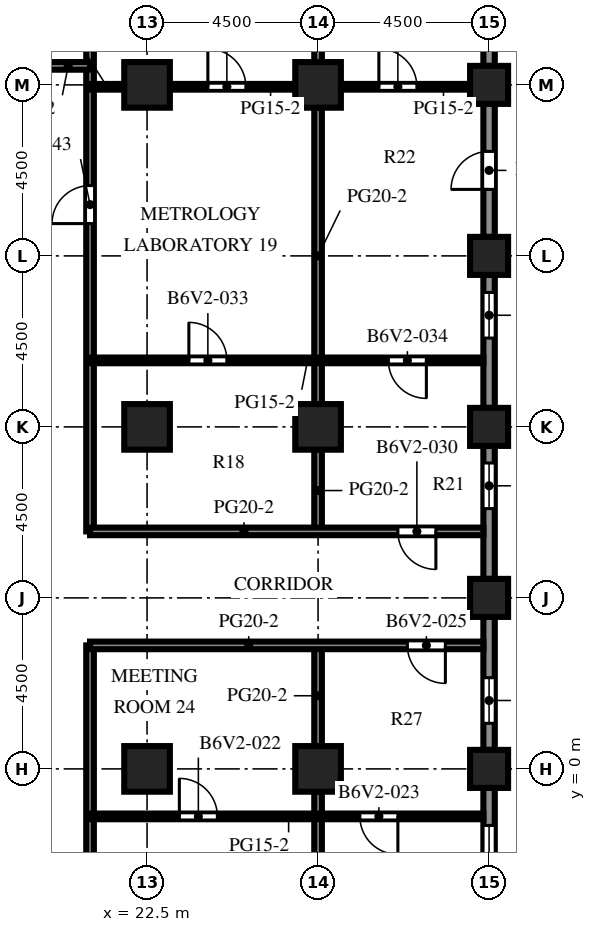
"""IFC4 building model, lengths in metres.
Left out: names, types, materials, properties, quantities, classifications, styles, units other than length and angle.
Written with IfcOpenShell. Run it as: python <this file> out.ifc"""

import sys

from ifc_helpers import new_model, si_unit, direction, frame, frame_2d, origin, origin_2d, place, context, subcontext, project, spatial, rectangle, extrude, element, fill, save


model = new_model("IFC4")
c1 = context("Model", 3, precision=1e-05, world=origin(), true_north=direction((0.0, 1.0)))
c2 = subcontext(c1, "Body", "Model", "MODEL_VIEW")
j1 = project(units=[si_unit("LENGTHUNIT", "METRE"), si_unit("PLANEANGLEUNIT", "RADIAN")], contexts=[c1])
p1 = place(None, origin())
s1 = spatial("IfcSite", under=j1, at=p1, CompositionType="ELEMENT")
p2 = place(p1, origin())
s2 = spatial("IfcBuilding", under=s1, at=p2, CompositionType="ELEMENT")
p3 = place(p2, frame((0.0, 0.0, 216.1)))
s3 = spatial("IfcBuildingStorey", under=s2, at=p3, CompositionType="ELEMENT", Elevation=216.1)
for number, where, z_axis, x_axis in (
    (1, (31.5, 0.0, 0.0), (0.0, 0.0, 1.0), (1.0, 0.0, 0.0)),
    (2, (31.5, 4.5, 0.0), (0.0, 0.0, 1.0), (1.0, 0.0, 0.0)),
    (3, (31.5, 9.0, 0.0), (0.0, 0.0, 1.0), (1.0, 0.0, 0.0)),
    (4, (31.5, 13.5, 0.0), (0.0, 0.0, 1.0), (1.0, 0.0, 0.0)),
    (5, (31.5, 18.0, 0.0), (0.0, 0.0, 1.0), (1.0, 0.0, 0.0)),
):
    element("IfcColumn", number, at=place(p3, frame(where, z_axis=z_axis, x_axis=x_axis)), inside=s3, PredefinedType="COLUMN", context=c2, shape_type="SweptSolid", body=[
        extrude(rectangle(XDim=1.0, YDim=1.0, at=origin_2d()), origin(), (0.0, 0.0, 1.0), 4.1),
    ])
for number, where, z_axis, x_axis in (
    (6, (22.5, 0.0, 0.0), (0.0, 0.0, 1.0), (1.0, 0.0, 0.0)),
    (7, (22.5, 9.0, 0.0), (0.0, 0.0, 1.0), (1.0, 0.0, 0.0)),
    (8, (22.5, 18.0, 0.0), (0.0, 0.0, 1.0), (1.0, 0.0, 0.0)),
    (9, (27.0, 0.0, 0.0), (0.0, 0.0, 1.0), (1.0, 0.0, 0.0)),
    (10, (27.0, 9.0, 0.0), (0.0, 0.0, 1.0), (1.0, 0.0, 0.0)),
    (11, (27.0, 18.0, 0.0), (0.0, 0.0, 1.0), (1.0, 0.0, 0.0)),
):
    element("IfcColumn", number, at=place(p3, frame(where, z_axis=z_axis, x_axis=x_axis)), inside=s3, PredefinedType="COLUMN", context=c2, shape_type="SweptSolid", body=[
        extrude(rectangle(XDim=1.2, YDim=1.2, at=origin_2d()), origin(), (0.0, 0.0, 1.0), 4.1),
    ])
p4 = place(p3, frame((31.5, -0.5, 0.0), z_axis=(0.0, 0.0, 1.0), x_axis=(0.0, -1.0, 0.0)))
e12 = element("IfcWall", 12, at=p4, inside=s3, PredefinedType="SOLIDWALL", context=c2, shape_type="SweptSolid", body=[
    extrude(rectangle(XDim=3.5, YDim=0.3, at=frame_2d((1.75, 0.0))), origin(), (0.0, 0.0, 1.0), 2.7),
])
p5 = place(p4, frame((0.988, 0.0, 0.8)))
e13 = element("IfcOpeningElement", 13, at=p5, cuts=e12, PredefinedType="OPENING", context=c2, shape_type="SweptSolid", body=[
    extrude(rectangle(XDim=2.4, YDim=1.7, at=frame_2d((1.2, 0.85))), frame((0.0, 0.16, 0.0), z_axis=(0.0, -1.0, 0.0), x_axis=(1.0, 0.0, 0.0)), (0.0, 0.0, 1.0), 0.32),
])
p6 = place(p3, frame((31.5, 4.0, 0.0), z_axis=(0.0, 0.0, 1.0), x_axis=(0.0, -1.0, 0.0)))
e14 = element("IfcWall", 14, at=p6, inside=s3, PredefinedType="SOLIDWALL", context=c2, shape_type="SweptSolid", body=[
    extrude(rectangle(XDim=3.5, YDim=0.3, at=frame_2d((1.75, 0.0))), origin(), (0.0, 0.0, 1.0), 2.7),
])
p7 = place(p6, frame((1.6, 0.0, 0.8)))
e15 = element("IfcOpeningElement", 15, at=p7, cuts=e14, PredefinedType="OPENING", context=c2, shape_type="SweptSolid", body=[
    extrude(rectangle(XDim=1.2, YDim=1.7, at=frame_2d((0.6, 0.85))), frame((0.0, 0.16, 0.0), z_axis=(0.0, -1.0, 0.0), x_axis=(1.0, 0.0, 0.0)), (0.0, 0.0, 1.0), 0.32),
])
p8 = place(p3, frame((31.5, 8.5, 0.0), z_axis=(0.0, 0.0, 1.0), x_axis=(0.0, -1.0, 0.0)))
e16 = element("IfcWall", 16, at=p8, inside=s3, PredefinedType="SOLIDWALL", context=c2, shape_type="SweptSolid", body=[
    extrude(rectangle(XDim=3.5, YDim=0.3, at=frame_2d((1.75, 0.0))), origin(), (0.0, 0.0, 1.0), 2.7),
])
p9 = place(p8, frame((0.45, 0.0, 0.8)))
e17 = element("IfcOpeningElement", 17, at=p9, cuts=e16, PredefinedType="OPENING", context=c2, shape_type="SweptSolid", body=[
    extrude(rectangle(XDim=1.2, YDim=1.7, at=frame_2d((0.6, 0.85))), frame((0.0, 0.16, 0.0), z_axis=(0.0, -1.0, 0.0), x_axis=(1.0, 0.0, 0.0)), (0.0, 0.0, 1.0), 0.32),
])
p10 = place(p3, frame((31.5, 13.0, 0.0), z_axis=(0.0, 0.0, 1.0), x_axis=(0.0, -1.0, 0.0)))
e18 = element("IfcWall", 18, at=p10, inside=s3, PredefinedType="SOLIDWALL", context=c2, shape_type="SweptSolid", body=[
    extrude(rectangle(XDim=3.5, YDim=0.3, at=frame_2d((1.75, 0.0))), origin(), (0.0, 0.0, 1.0), 2.7),
])
p11 = place(p10, frame((0.462, 0.0, 0.8)))
e19 = element("IfcOpeningElement", 19, at=p11, cuts=e18, PredefinedType="OPENING", context=c2, shape_type="SweptSolid", body=[
    extrude(rectangle(XDim=1.2, YDim=1.7, at=frame_2d((0.6, 0.85))), frame((0.0, 0.16, 0.0), z_axis=(0.0, -1.0, 0.0), x_axis=(1.0, 0.0, 0.0)), (0.0, 0.0, 1.0), 0.32),
])
p12 = place(p3, frame((31.5, 17.5, 0.0), z_axis=(0.0, 0.0, 1.0), x_axis=(0.0, -1.0, 0.0)))
e20 = element("IfcWall", 20, at=p12, inside=s3, PredefinedType="SOLIDWALL", context=c2, shape_type="SweptSolid", body=[
    extrude(rectangle(XDim=3.5, YDim=0.3, at=frame_2d((1.75, 0.0))), origin(), (0.0, 0.0, 1.0), 2.7),
])
p13 = place(p12, frame((1.25, 0.0, 0.0)))
e21 = element("IfcOpeningElement", 21, at=p13, cuts=e20, PredefinedType="OPENING", context=c2, shape_type="SweptSolid", body=[
    extrude(rectangle(XDim=1.0, YDim=2.2, at=frame_2d((0.5, 1.1))), frame((0.0, 0.16, 0.0), z_axis=(0.0, -1.0, 0.0), x_axis=(1.0, 0.0, 0.0)), (0.0, 0.0, 1.0), 0.32),
])
p14 = place(p3, frame((31.5, 22.0, 0.0), z_axis=(0.0, 0.0, 1.0), x_axis=(0.0, -1.0, 0.0)))
e22 = element("IfcWall", 22, at=p14, inside=s3, PredefinedType="SOLIDWALL", context=c2, shape_type="SweptSolid", body=[
    extrude(rectangle(XDim=3.5, YDim=0.3, at=frame_2d((1.75, 0.0))), origin(), (0.0, 0.0, 1.0), 2.7),
])
p15 = place(p14, frame((0.55, 0.0, 0.8)))
e23 = element("IfcOpeningElement", 23, at=p15, cuts=e22, PredefinedType="OPENING", context=c2, shape_type="SweptSolid", body=[
    extrude(rectangle(XDim=2.4, YDim=1.7, at=frame_2d((1.2, 0.85))), frame((0.0, 0.16, 0.0), z_axis=(0.0, -1.0, 0.0), x_axis=(1.0, 0.0, 0.0)), (0.0, 0.0, 1.0), 0.32),
])
p16 = place(p3, frame((21.0, 3.25, 0.0), z_axis=(0.0, 0.0, 1.0), x_axis=(0.0, -1.0, 0.0)))
e24 = element("IfcWall", 24, at=p16, inside=s3, PredefinedType="PARTITIONING", context=c2, shape_type="SweptSolid", body=[
    extrude(rectangle(XDim=30.1, YDim=0.2, at=frame_2d((15.05, 0.0))), origin(), (0.0, 0.0, 1.0), 3.5),
])
p17 = place(p16, frame((7.1, 0.0, 0.0)))
e25 = element("IfcOpeningElement", 25, at=p17, cuts=e24, PredefinedType="OPENING", context=c2, shape_type="SweptSolid", body=[
    extrude(rectangle(XDim=1.0, YDim=2.1, at=frame_2d((0.5, 1.05))), frame((0.0, 0.11, 0.0), z_axis=(0.0, -1.0, 0.0), x_axis=(1.0, 0.0, 0.0)), (0.0, 0.0, 1.0), 0.22),
])
p18 = place(p3, frame((21.0, 26.85, 0.0), z_axis=(0.0, 0.0, 1.0), x_axis=(0.0, -1.0, 0.0)))
e26 = element("IfcWall", 26, at=p18, inside=s3, PredefinedType="PARTITIONING", context=c2, shape_type="SweptSolid", body=[
    extrude(rectangle(XDim=20.6, YDim=0.2, at=frame_2d((10.3, 0.0))), origin(), (0.0, 0.0, 1.0), 3.5),
])
p19 = place(p18, frame((11.5, 0.0, 0.0)))
e27 = element("IfcOpeningElement", 27, at=p19, cuts=e26, PredefinedType="OPENING", context=c2, shape_type="SweptSolid", body=[
    extrude(rectangle(XDim=1.0, YDim=2.1, at=frame_2d((0.5, 1.05))), frame((0.0, 0.11, 0.0), z_axis=(0.0, -1.0, 0.0), x_axis=(1.0, 0.0, 0.0)), (0.0, 0.0, 1.0), 0.22),
])
p20 = place(p3, frame((27.0, -8.4, 0.0), z_axis=(0.0, 0.0, 1.0), x_axis=(0.0, 1.0, 0.0)))
e28 = element("IfcWall", 28, at=p20, inside=s3, PredefinedType="PARTITIONING", context=c2, shape_type="SweptSolid", body=[
    extrude(rectangle(XDim=7.8, YDim=0.2, at=frame_2d((3.9, 0.0))), origin(), (0.0, 0.0, 1.0), 3.5),
])
p21 = place(p3, frame((27.0, 0.6, 0.0), z_axis=(0.0, 0.0, 1.0), x_axis=(0.0, 1.0, 0.0)))
e29 = element("IfcWall", 29, at=p21, inside=s3, PredefinedType="PARTITIONING", context=c2, shape_type="SweptSolid", body=[
    extrude(rectangle(XDim=2.65, YDim=0.2, at=frame_2d((1.325, 0.0))), origin(), (0.0, 0.0, 1.0), 3.5),
])
p22 = place(p3, frame((27.0, 6.25, 0.0), z_axis=(0.0, 0.0, 1.0), x_axis=(0.0, 1.0, 0.0)))
e30 = element("IfcWall", 30, at=p22, inside=s3, PredefinedType="PARTITIONING", context=c2, shape_type="SweptSolid", body=[
    extrude(rectangle(XDim=2.15, YDim=0.2, at=frame_2d((1.075, 0.0))), origin(), (0.0, 0.0, 1.0), 3.5),
])
p23 = place(p3, frame((27.0, 9.6, 0.0), z_axis=(0.0, 0.0, 1.0), x_axis=(0.0, 1.0, 0.0)))
e31 = element("IfcWall", 31, at=p23, inside=s3, PredefinedType="PARTITIONING", context=c2, shape_type="SweptSolid", body=[
    extrude(rectangle(XDim=7.8, YDim=0.2, at=frame_2d((3.9, 0.0))), origin(), (0.0, 0.0, 1.0), 3.5),
])
p24 = place(p3, frame((27.0, 18.6, 0.0), z_axis=(0.0, 0.0, 1.0), x_axis=(0.0, 1.0, 0.0)))
e32 = element("IfcWall", 32, at=p24, inside=s3, PredefinedType="PARTITIONING", context=c2, shape_type="SweptSolid", body=[
    extrude(rectangle(XDim=7.9, YDim=0.2, at=frame_2d((3.95, 0.0))), origin(), (0.0, 0.0, 1.0), 3.5),
])
p25 = place(p3, frame((21.0, -1.25, 0.0), z_axis=(0.0, 0.0, 1.0), x_axis=(1.0, 0.0, 0.0)))
e33 = element("IfcWall", 33, at=p25, inside=s3, PredefinedType="PARTITIONING", context=c2, shape_type="SweptSolid", body=[
    extrude(rectangle(XDim=10.35, YDim=0.15, at=frame_2d((5.175, 0.0))), origin(), (0.0, 0.0, 1.0), 3.5),
])
p26 = place(p25, frame((2.35, 0.0, 0.0)))
e34 = element("IfcOpeningElement", 34, at=p26, cuts=e33, PredefinedType="OPENING", context=c2, shape_type="SweptSolid", body=[
    extrude(rectangle(XDim=1.0, YDim=2.1, at=frame_2d((0.5, 1.05))), frame((0.0, 0.085, 0.0), z_axis=(0.0, -1.0, 0.0), x_axis=(1.0, 0.0, 0.0)), (0.0, 0.0, 1.0), 0.17),
])
p27 = place(p25, frame((7.1, 0.0, 0.0)))
e35 = element("IfcOpeningElement", 35, at=p27, cuts=e33, PredefinedType="OPENING", context=c2, shape_type="SweptSolid", body=[
    extrude(rectangle(XDim=1.0, YDim=2.1, at=frame_2d((0.5, 1.05))), frame((0.0, 0.085, 0.0), z_axis=(0.0, -1.0, 0.0), x_axis=(1.0, 0.0, 0.0)), (0.0, 0.0, 1.0), 0.17),
])
p28 = place(p3, frame((31.35, 3.25, 0.0), z_axis=(0.0, 0.0, 1.0), x_axis=(-1.0, 0.0, 0.0)))
e36 = element("IfcWall", 36, at=p28, inside=s3, PredefinedType="PARTITIONING", context=c2, shape_type="SweptSolid", body=[
    extrude(rectangle(XDim=10.35, YDim=0.2, at=frame_2d((5.175, 0.0))), origin(), (0.0, 0.0, 1.0), 3.5),
])
p29 = place(p28, frame((1.0, 0.0, 0.0)))
e37 = element("IfcOpeningElement", 37, at=p29, cuts=e36, PredefinedType="OPENING", context=c2, shape_type="SweptSolid", body=[
    extrude(rectangle(XDim=1.0, YDim=2.1, at=frame_2d((0.5, 1.05))), frame((0.0, 0.11, 0.0), z_axis=(0.0, -1.0, 0.0), x_axis=(1.0, 0.0, 0.0)), (0.0, 0.0, 1.0), 0.22),
])
p30 = place(p3, frame((21.0, 6.25, 0.0), z_axis=(0.0, 0.0, 1.0), x_axis=(1.0, 0.0, 0.0)))
e38 = element("IfcWall", 38, at=p30, inside=s3, PredefinedType="PARTITIONING", context=c2, shape_type="SweptSolid", body=[
    extrude(rectangle(XDim=10.35, YDim=0.2, at=frame_2d((5.175, 0.0))), origin(), (0.0, 0.0, 1.0), 3.5),
])
p31 = place(p30, frame((8.1, 0.0, 0.0)))
e39 = element("IfcOpeningElement", 39, at=p31, cuts=e38, PredefinedType="OPENING", context=c2, shape_type="SweptSolid", body=[
    extrude(rectangle(XDim=1.0, YDim=2.1, at=frame_2d((0.5, 1.05))), frame((0.0, 0.11, 0.0), z_axis=(0.0, -1.0, 0.0), x_axis=(1.0, 0.0, 0.0)), (0.0, 0.0, 1.0), 0.22),
])
p32 = place(p3, frame((31.35, 10.75, 0.0), z_axis=(0.0, 0.0, 1.0), x_axis=(-1.0, 0.0, 0.0)))
e40 = element("IfcWall", 40, at=p32, inside=s3, PredefinedType="PARTITIONING", context=c2, shape_type="SweptSolid", body=[
    extrude(rectangle(XDim=10.35, YDim=0.15, at=frame_2d((5.175, 0.0))), origin(), (0.0, 0.0, 1.0), 3.5),
])
p33 = place(p32, frame((6.75, 0.0, 0.0)))
e41 = element("IfcOpeningElement", 41, at=p33, cuts=e40, PredefinedType="OPENING", context=c2, shape_type="SweptSolid", body=[
    extrude(rectangle(XDim=1.0, YDim=2.1, at=frame_2d((0.5, 1.05))), frame((0.0, 0.085, 0.0), z_axis=(0.0, -1.0, 0.0), x_axis=(1.0, 0.0, 0.0)), (0.0, 0.0, 1.0), 0.17),
])
p34 = place(p32, frame((1.5, 0.0, 0.0)))
e42 = element("IfcOpeningElement", 42, at=p34, cuts=e40, PredefinedType="OPENING", context=c2, shape_type="SweptSolid", body=[
    extrude(rectangle(XDim=1.0, YDim=2.1, at=frame_2d((0.5, 1.05))), frame((0.0, 0.085, 0.0), z_axis=(0.0, -1.0, 0.0), x_axis=(1.0, 0.0, 0.0)), (0.0, 0.0, 1.0), 0.17),
])
p35 = place(p3, frame((21.0, 17.95, 0.0), z_axis=(0.0, 0.0, 1.0), x_axis=(1.0, 0.0, 0.0)))
e43 = element("IfcWall", 43, at=p35, inside=s3, PredefinedType="PARTITIONING", context=c2, shape_type="SweptSolid", body=[
    extrude(rectangle(XDim=0.9, YDim=0.15, at=frame_2d((0.45, 0.0))), origin(), (0.0, 0.0, 1.0), 3.5),
])
p36 = place(p3, frame((23.1, 17.95, 0.0), z_axis=(0.0, 0.0, 1.0), x_axis=(1.0, 0.0, 0.0)))
e44 = element("IfcWall", 44, at=p36, inside=s3, PredefinedType="PARTITIONING", context=c2, shape_type="SweptSolid", body=[
    extrude(rectangle(XDim=3.3, YDim=0.15, at=frame_2d((1.65, 0.0))), origin(), (0.0, 0.0, 1.0), 3.5),
])
p37 = place(p36, frame((1.0, 0.0, 0.0)))
e45 = element("IfcOpeningElement", 45, at=p37, cuts=e44, PredefinedType="OPENING", context=c2, shape_type="SweptSolid", body=[
    extrude(rectangle(XDim=1.0, YDim=2.1, at=frame_2d((0.5, 1.05))), frame((0.0, 0.085, 0.0), z_axis=(0.0, -1.0, 0.0), x_axis=(1.0, 0.0, 0.0)), (0.0, 0.0, 1.0), 0.17),
])
p38 = place(p3, frame((27.6, 17.95, 0.0), z_axis=(0.0, 0.0, 1.0), x_axis=(1.0, 0.0, 0.0)))
e46 = element("IfcWall", 46, at=p38, inside=s3, PredefinedType="PARTITIONING", context=c2, shape_type="SweptSolid", body=[
    extrude(rectangle(XDim=3.4, YDim=0.15, at=frame_2d((1.7, 0.0))), origin(), (0.0, 0.0, 1.0), 3.5),
])
p39 = place(p38, frame((1.0, 0.0, 0.0)))
e47 = element("IfcOpeningElement", 47, at=p39, cuts=e46, PredefinedType="OPENING", context=c2, shape_type="SweptSolid", body=[
    extrude(rectangle(XDim=1.0, YDim=2.1, at=frame_2d((0.5, 1.05))), frame((0.0, 0.085, 0.0), z_axis=(0.0, -1.0, 0.0), x_axis=(1.0, 0.0, 0.0)), (0.0, 0.0, 1.0), 0.17),
])
p40 = place(p3, frame((18.0, 18.5, 0.0), z_axis=(0.0, 0.0, 1.0), x_axis=(1.0, 0.0, 0.0)))
e48 = element("IfcWall", 48, at=p40, inside=s3, PredefinedType="PARTITIONING", context=c2, shape_type="SweptSolid", body=[
    extrude(rectangle(XDim=3.0, YDim=0.2, at=frame_2d((1.5, 0.0))), origin(), (0.0, 0.0, 1.0), 3.5),
])
p41 = place(p40, frame((0.85, 0.0, 0.0)))
e49 = element("IfcOpeningElement", 49, at=p41, cuts=e48, PredefinedType="OPENING", context=c2, shape_type="SweptSolid", body=[
    extrude(rectangle(XDim=1.0, YDim=2.1, at=frame_2d((0.5, 1.05))), frame((0.0, 0.11, 0.0), z_axis=(0.0, -1.0, 0.0), x_axis=(1.0, 0.0, 0.0)), (0.0, 0.0, 1.0), 0.22),
])
p42 = place(p5, origin())
e50 = element("IfcWindow", 50, at=p42, inside=s3, PartitioningType="SINGLE_PANEL", PredefinedType="WINDOW", context=c2, shape_type="SweptSolid", body=[
    extrude(rectangle(XDim=2.4, YDim=1.7, at=frame_2d((1.2, 0.85))), frame((0.0, 0.03, 0.0), z_axis=(0.0, -1.0, 0.0), x_axis=(1.0, 0.0, 0.0)), (0.0, 0.0, 1.0), 0.06),
])
fill(e13, e50)
p43 = place(p7, origin())
e51 = element("IfcWindow", 51, at=p43, inside=s3, PartitioningType="SINGLE_PANEL", PredefinedType="WINDOW", context=c2, shape_type="SweptSolid", body=[
    extrude(rectangle(XDim=1.2, YDim=1.7, at=frame_2d((0.6, 0.85))), frame((0.0, 0.03, 0.0), z_axis=(0.0, -1.0, 0.0), x_axis=(1.0, 0.0, 0.0)), (0.0, 0.0, 1.0), 0.06),
])
fill(e15, e51)
p44 = place(p9, origin())
e52 = element("IfcWindow", 52, at=p44, inside=s3, PartitioningType="SINGLE_PANEL", PredefinedType="WINDOW", context=c2, shape_type="SweptSolid", body=[
    extrude(rectangle(XDim=1.2, YDim=1.7, at=frame_2d((0.6, 0.85))), frame((0.0, 0.03, 0.0), z_axis=(0.0, -1.0, 0.0), x_axis=(1.0, 0.0, 0.0)), (0.0, 0.0, 1.0), 0.06),
])
fill(e17, e52)
p45 = place(p11, origin())
e53 = element("IfcWindow", 53, at=p45, inside=s3, PartitioningType="SINGLE_PANEL", PredefinedType="WINDOW", context=c2, shape_type="SweptSolid", body=[
    extrude(rectangle(XDim=1.2, YDim=1.7, at=frame_2d((0.6, 0.85))), frame((0.0, 0.03, 0.0), z_axis=(0.0, -1.0, 0.0), x_axis=(1.0, 0.0, 0.0)), (0.0, 0.0, 1.0), 0.06),
])
fill(e19, e53)
p46 = place(p13, origin())
e54 = element("IfcDoor", 54, at=p46, inside=s3, OperationType="SINGLE_SWING_RIGHT", PredefinedType="DOOR", context=c2, shape_type="SweptSolid", body=[
    extrude(rectangle(XDim=1.0, YDim=2.2, at=frame_2d((0.5, 1.1))), frame((0.0, 0.025, 0.0), z_axis=(0.0, -1.0, 0.0), x_axis=(1.0, 0.0, 0.0)), (0.0, 0.0, 1.0), 0.05),
])
fill(e21, e54)
p47 = place(p26, origin())
e55 = element("IfcDoor", 55, at=p47, inside=s3, OperationType="SINGLE_SWING_LEFT", PredefinedType="DOOR", context=c2, shape_type="SweptSolid", body=[
    extrude(rectangle(XDim=1.0, YDim=2.1, at=frame_2d((0.5, 1.05))), frame((0.0, 0.025, 0.0), z_axis=(0.0, -1.0, 0.0), x_axis=(1.0, 0.0, 0.0)), (0.0, 0.0, 1.0), 0.05),
])
fill(e34, e55)
p48 = place(p27, origin())
e56 = element("IfcDoor", 56, at=p48, inside=s3, OperationType="SINGLE_SWING_RIGHT", PredefinedType="DOOR", context=c2, shape_type="SweptSolid", body=[
    extrude(rectangle(XDim=1.0, YDim=2.1, at=frame_2d((0.5, 1.05))), frame((0.0, 0.025, 0.0), z_axis=(0.0, -1.0, 0.0), x_axis=(1.0, 0.0, 0.0)), (0.0, 0.0, 1.0), 0.05),
])
fill(e35, e56)
p49 = place(p29, origin())
e57 = element("IfcDoor", 57, at=p49, inside=s3, OperationType="SINGLE_SWING_LEFT", PredefinedType="DOOR", context=c2, shape_type="SweptSolid", body=[
    extrude(rectangle(XDim=1.0, YDim=2.1, at=frame_2d((0.5, 1.05))), frame((0.0, 0.025, 0.0), z_axis=(0.0, -1.0, 0.0), x_axis=(1.0, 0.0, 0.0)), (0.0, 0.0, 1.0), 0.05),
])
fill(e37, e57)
p50 = place(p31, origin())
e58 = element("IfcDoor", 58, at=p50, inside=s3, OperationType="SINGLE_SWING_RIGHT", PredefinedType="DOOR", context=c2, shape_type="SweptSolid", body=[
    extrude(rectangle(XDim=1.0, YDim=2.1, at=frame_2d((0.5, 1.05))), frame((0.0, 0.025, 0.0), z_axis=(0.0, -1.0, 0.0), x_axis=(1.0, 0.0, 0.0)), (0.0, 0.0, 1.0), 0.05),
])
fill(e39, e58)
p51 = place(p33, origin())
e59 = element("IfcDoor", 59, at=p51, inside=s3, OperationType="SINGLE_SWING_RIGHT", PredefinedType="DOOR", context=c2, shape_type="SweptSolid", body=[
    extrude(rectangle(XDim=1.0, YDim=2.1, at=frame_2d((0.5, 1.05))), frame((0.0, 0.025, 0.0), z_axis=(0.0, -1.0, 0.0), x_axis=(1.0, 0.0, 0.0)), (0.0, 0.0, 1.0), 0.05),
])
fill(e41, e59)
p52 = place(p34, origin())
e60 = element("IfcDoor", 60, at=p52, inside=s3, OperationType="SINGLE_SWING_LEFT", PredefinedType="DOOR", context=c2, shape_type="SweptSolid", body=[
    extrude(rectangle(XDim=1.0, YDim=2.1, at=frame_2d((0.5, 1.05))), frame((0.0, 0.025, 0.0), z_axis=(0.0, -1.0, 0.0), x_axis=(1.0, 0.0, 0.0)), (0.0, 0.0, 1.0), 0.05),
])
fill(e42, e60)
p53 = place(p37, origin())
e61 = element("IfcDoor", 61, at=p53, inside=s3, OperationType="SINGLE_SWING_LEFT", PredefinedType="DOOR", context=c2, shape_type="SweptSolid", body=[
    extrude(rectangle(XDim=1.0, YDim=2.1, at=frame_2d((0.5, 1.05))), frame((0.0, 0.025, 0.0), z_axis=(0.0, -1.0, 0.0), x_axis=(1.0, 0.0, 0.0)), (0.0, 0.0, 1.0), 0.05),
])
fill(e45, e61)
p54 = place(p39, origin())
e62 = element("IfcDoor", 62, at=p54, inside=s3, OperationType="SINGLE_SWING_LEFT", PredefinedType="DOOR", context=c2, shape_type="SweptSolid", body=[
    extrude(rectangle(XDim=1.0, YDim=2.1, at=frame_2d((0.5, 1.05))), frame((0.0, 0.025, 0.0), z_axis=(0.0, -1.0, 0.0), x_axis=(1.0, 0.0, 0.0)), (0.0, 0.0, 1.0), 0.05),
])
fill(e47, e62)
p55 = place(p19, origin())
e63 = element("IfcDoor", 63, at=p55, inside=s3, OperationType="SINGLE_SWING_RIGHT", PredefinedType="DOOR", context=c2, shape_type="SweptSolid", body=[
    extrude(rectangle(XDim=1.0, YDim=2.1, at=frame_2d((0.5, 1.05))), frame((0.0, 0.025, 0.0), z_axis=(0.0, -1.0, 0.0), x_axis=(1.0, 0.0, 0.0)), (0.0, 0.0, 1.0), 0.05),
])
fill(e27, e63)
save(model, sys.argv[1])
